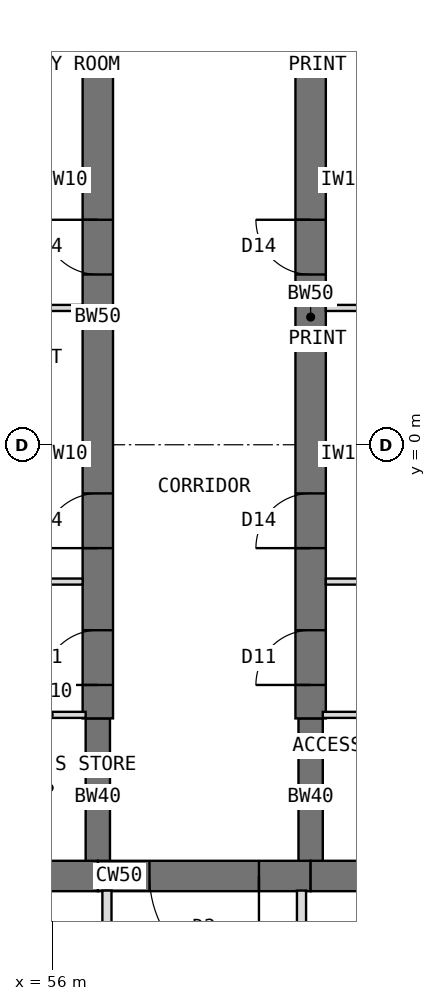
"""IFC4 building model, lengths in metres.
Left out: names, types, materials, properties, quantities, classifications, styles, units other than length and angle.
Written with IfcOpenShell. Run it as: python <this file> out.ifc"""

import sys

from ifc_helpers import new_model, si_unit, direction, frame, frame_2d, origin, place, context, subcontext, project, spatial, rectangle, extrude, element, fill, save


model = new_model("IFC4")
c1 = context("Model", 3, precision=1e-05, world=origin(), true_north=direction((0.0, 1.0)))
c2 = subcontext(c1, "Body", "Model", "MODEL_VIEW")
j1 = project(units=[si_unit("LENGTHUNIT", "METRE"), si_unit("PLANEANGLEUNIT", "RADIAN")], contexts=[c1])
p1 = place(None, origin())
s1 = spatial("IfcSite", under=j1, at=p1, CompositionType="ELEMENT")
p2 = place(p1, origin())
s2 = spatial("IfcBuilding", under=s1, at=p2, CompositionType="ELEMENT")
p3 = place(p2, frame((0.0, 0.0, 218.5)))
s3 = spatial("IfcBuildingStorey", under=s2, at=p3, CompositionType="ELEMENT", Elevation=218.5)
p4 = place(p3, frame((64.798, -7.092, 0.0), z_axis=(0.0, 0.0, 1.0), x_axis=(-1.0, 0.0, 0.0)))
e1 = element("IfcWall", 1, at=p4, inside=s3, PredefinedType="SHEAR", context=c2, shape_type="SweptSolid", body=[
    extrude(rectangle(XDim=4.548, YDim=0.5, at=frame_2d((2.274, 0.0))), origin(), (0.0, 0.0, 1.0), 4.0),
])
p5 = place(p3, frame((60.25, -7.092, 0.0), z_axis=(0.0, 0.0, 1.0), x_axis=(-1.0, 0.0, 0.0)))
e2 = element("IfcWall", 2, at=p5, inside=s3, PredefinedType="SHEAR", context=c2, shape_type="SweptSolid", body=[
    extrude(rectangle(XDim=3.5, YDim=0.5, at=frame_2d((1.75, 0.0))), origin(), (0.0, 0.0, 1.0), 4.0),
])
p6 = place(p5, frame((0.85, 0.0, 0.0)))
e3 = element("IfcOpeningElement", 3, at=p6, cuts=e2, PredefinedType="OPENING", context=c2, shape_type="SweptSolid", body=[
    extrude(rectangle(XDim=1.8, YDim=2.1, at=frame_2d((0.9, 1.05))), frame((0.0, 0.26, 0.0), z_axis=(0.0, -1.0, 0.0), x_axis=(1.0, 0.0, 0.0)), (0.0, 0.0, 1.0), 0.52),
])
p7 = place(p3, frame((56.75, -7.092, 0.0), z_axis=(0.0, 0.0, 1.0), x_axis=(-1.0, 0.0, 0.0)))
e4 = element("IfcWall", 4, at=p7, inside=s3, PredefinedType="SHEAR", context=c2, shape_type="SweptSolid", body=[
    extrude(rectangle(XDim=4.548, YDim=0.5, at=frame_2d((2.274, 0.0))), origin(), (0.0, 0.0, 1.0), 4.0),
])
p8 = place(p3, frame((56.75, -7.092, 0.0), z_axis=(0.0, 0.0, 1.0), x_axis=(0.0, 1.0, 0.0)))
e5 = element("IfcWall", 5, at=p8, inside=s3, PredefinedType="SHEAR", context=c2, shape_type="SweptSolid", body=[
    extrude(rectangle(XDim=2.592, YDim=0.4, at=frame_2d((1.296, 0.0))), origin(), (0.0, 0.0, 1.0), 4.0),
])
p9 = place(p3, frame((56.75, -4.5, 0.0), z_axis=(0.0, 0.0, 1.0), x_axis=(0.0, 1.0, 0.0)))
e6 = element("IfcWall", 6, at=p9, inside=s3, PredefinedType="SHEAR", context=c2, shape_type="SweptSolid", body=[
    extrude(rectangle(XDim=13.2, YDim=0.5, at=frame_2d((6.6, 0.0))), origin(), (0.0, 0.0, 1.0), 4.0),
])
p10 = place(p9, frame((0.55, 0.0, 0.0)))
e7 = element("IfcOpeningElement", 7, at=p10, cuts=e6, PredefinedType="OPENING", context=c2, shape_type="SweptSolid", body=[
    extrude(rectangle(XDim=0.9, YDim=2.1, at=frame_2d((0.45, 1.05))), frame((0.0, 0.26, 0.0), z_axis=(0.0, -1.0, 0.0), x_axis=(1.0, 0.0, 0.0)), (0.0, 0.0, 1.0), 0.52),
])
p11 = place(p9, frame((2.8, 0.0, 0.0)))
e8 = element("IfcOpeningElement", 8, at=p11, cuts=e6, PredefinedType="OPENING", context=c2, shape_type="SweptSolid", body=[
    extrude(rectangle(XDim=0.9, YDim=2.1, at=frame_2d((0.45, 1.05))), frame((0.0, 0.26, 0.0), z_axis=(0.0, -1.0, 0.0), x_axis=(1.0, 0.0, 0.0)), (0.0, 0.0, 1.0), 0.52),
])
p12 = place(p9, frame((7.3, 0.0, 0.0)))
e9 = element("IfcOpeningElement", 9, at=p12, cuts=e6, PredefinedType="OPENING", context=c2, shape_type="SweptSolid", body=[
    extrude(rectangle(XDim=0.9, YDim=2.1, at=frame_2d((0.45, 1.05))), frame((0.0, 0.26, 0.0), z_axis=(0.0, -1.0, 0.0), x_axis=(1.0, 0.0, 0.0)), (0.0, 0.0, 1.0), 0.52),
])
p13 = place(p3, frame((60.25, -7.092, 0.0), z_axis=(0.0, 0.0, 1.0), x_axis=(0.0, 1.0, 0.0)))
e10 = element("IfcWall", 10, at=p13, inside=s3, PredefinedType="SHEAR", context=c2, shape_type="SweptSolid", body=[
    extrude(rectangle(XDim=2.592, YDim=0.4, at=frame_2d((1.296, 0.0))), origin(), (0.0, 0.0, 1.0), 4.0),
])
p14 = place(p3, frame((60.25, -4.5, 0.0), z_axis=(0.0, 0.0, 1.0), x_axis=(0.0, 1.0, 0.0)))
e11 = element("IfcWall", 11, at=p14, inside=s3, PredefinedType="SHEAR", context=c2, shape_type="SweptSolid", body=[
    extrude(rectangle(XDim=13.2, YDim=0.5, at=frame_2d((6.6, 0.0))), origin(), (0.0, 0.0, 1.0), 4.0),
])
p15 = place(p14, frame((0.55, 0.0, 0.0)))
e12 = element("IfcOpeningElement", 12, at=p15, cuts=e11, PredefinedType="OPENING", context=c2, shape_type="SweptSolid", body=[
    extrude(rectangle(XDim=0.9, YDim=2.1, at=frame_2d((0.45, 1.05))), frame((0.0, 0.26, 0.0), z_axis=(0.0, -1.0, 0.0), x_axis=(1.0, 0.0, 0.0)), (0.0, 0.0, 1.0), 0.52),
])
p16 = place(p14, frame((2.8, 0.0, 0.0)))
e13 = element("IfcOpeningElement", 13, at=p16, cuts=e11, PredefinedType="OPENING", context=c2, shape_type="SweptSolid", body=[
    extrude(rectangle(XDim=0.9, YDim=2.1, at=frame_2d((0.45, 1.05))), frame((0.0, 0.26, 0.0), z_axis=(0.0, -1.0, 0.0), x_axis=(1.0, 0.0, 0.0)), (0.0, 0.0, 1.0), 0.52),
])
p17 = place(p14, frame((7.3, 0.0, 0.0)))
e14 = element("IfcOpeningElement", 14, at=p17, cuts=e11, PredefinedType="OPENING", context=c2, shape_type="SweptSolid", body=[
    extrude(rectangle(XDim=0.9, YDim=2.1, at=frame_2d((0.45, 1.05))), frame((0.0, 0.26, 0.0), z_axis=(0.0, -1.0, 0.0), x_axis=(1.0, 0.0, 0.0)), (0.0, 0.0, 1.0), 0.52),
])
for number, where, z_axis, x_axis in (
    (15, (56.5, -2.25, 0.0), (0.0, 0.0, 1.0), (-1.0, 0.0, 0.0)),
    (16, (56.5, 2.25, 0.0), (0.0, 0.0, 1.0), (-1.0, 0.0, 0.0)),
):
    element("IfcWall", number, at=place(p3, frame(where, z_axis=z_axis, x_axis=x_axis)), inside=s3, PredefinedType="PARTITIONING", context=c2, shape_type="SweptSolid", body=[
        extrude(rectangle(XDim=4.75, YDim=0.1, at=frame_2d((2.375, 0.0))), origin(), (0.0, 0.0, 1.0), 3.8),
    ])
p18 = place(p3, frame((56.5, -0.15, 0.0), z_axis=(0.0, 0.0, 1.0), x_axis=(-1.0, 0.0, 0.0)))
e17 = element("IfcWall", 17, at=p18, inside=s3, PredefinedType="PARTITIONING", context=c2, shape_type="SweptSolid", body=[
    extrude(rectangle(XDim=2.4, YDim=0.1, at=frame_2d((1.2, 0.0))), origin(), (0.0, 0.0, 1.0), 3.8),
])
p19 = place(p18, frame((0.75, 0.0, 0.0)))
e18 = element("IfcOpeningElement", 18, at=p19, cuts=e17, PredefinedType="OPENING", context=c2, shape_type="SweptSolid", body=[
    extrude(rectangle(XDim=0.9, YDim=2.1, at=frame_2d((0.45, 1.05))), frame((0.0, 0.06, 0.0), z_axis=(0.0, -1.0, 0.0), x_axis=(1.0, 0.0, 0.0)), (0.0, 0.0, 1.0), 0.12),
])
p20 = place(p3, frame((56.5, 4.35, 0.0), z_axis=(0.0, 0.0, 1.0), x_axis=(-1.0, 0.0, 0.0)))
e19 = element("IfcWall", 19, at=p20, inside=s3, PredefinedType="PARTITIONING", context=c2, shape_type="SweptSolid", body=[
    extrude(rectangle(XDim=2.4, YDim=0.1, at=frame_2d((1.2, 0.0))), origin(), (0.0, 0.0, 1.0), 3.8),
])
p21 = place(p20, frame((0.75, 0.0, 0.0)))
e20 = element("IfcOpeningElement", 20, at=p21, cuts=e19, PredefinedType="OPENING", context=c2, shape_type="SweptSolid", body=[
    extrude(rectangle(XDim=0.9, YDim=2.1, at=frame_2d((0.45, 1.05))), frame((0.0, 0.06, 0.0), z_axis=(0.0, -1.0, 0.0), x_axis=(1.0, 0.0, 0.0)), (0.0, 0.0, 1.0), 0.12),
])
p22 = place(p3, frame((56.55, -4.442, 0.0), z_axis=(0.0, 0.0, 1.0), x_axis=(-1.0, 0.0, 0.0)))
e21 = element("IfcWall", 21, at=p22, inside=s3, PredefinedType="PARTITIONING", context=c2, shape_type="SweptSolid", body=[
    extrude(rectangle(XDim=1.2, YDim=0.1, at=frame_2d((0.6, 0.0))), origin(), (0.0, 0.0, 1.0), 3.267),
])
for number, where, z_axis, x_axis in (
    (22, (60.5, -2.25, 0.0), (0.0, 0.0, 1.0), (1.0, 0.0, 0.0)),
    (23, (60.5, 2.25, 0.0), (0.0, 0.0, 1.0), (1.0, 0.0, 0.0)),
):
    element("IfcWall", number, at=place(p3, frame(where, z_axis=z_axis, x_axis=x_axis)), inside=s3, PredefinedType="PARTITIONING", context=c2, shape_type="SweptSolid", body=[
        extrude(rectangle(XDim=4.75, YDim=0.1, at=frame_2d((2.375, 0.0))), origin(), (0.0, 0.0, 1.0), 3.8),
    ])
p23 = place(p3, frame((60.5, -0.15, 0.0), z_axis=(0.0, 0.0, 1.0), x_axis=(1.0, 0.0, 0.0)))
e24 = element("IfcWall", 24, at=p23, inside=s3, PredefinedType="PARTITIONING", context=c2, shape_type="SweptSolid", body=[
    extrude(rectangle(XDim=2.4, YDim=0.1, at=frame_2d((1.2, 0.0))), origin(), (0.0, 0.0, 1.0), 3.8),
])
p24 = place(p23, frame((0.75, 0.0, 0.0)))
e25 = element("IfcOpeningElement", 25, at=p24, cuts=e24, PredefinedType="OPENING", context=c2, shape_type="SweptSolid", body=[
    extrude(rectangle(XDim=0.9, YDim=2.1, at=frame_2d((0.45, 1.05))), frame((0.0, 0.06, 0.0), z_axis=(0.0, -1.0, 0.0), x_axis=(1.0, 0.0, 0.0)), (0.0, 0.0, 1.0), 0.12),
])
p25 = place(p3, frame((60.5, 4.35, 0.0), z_axis=(0.0, 0.0, 1.0), x_axis=(1.0, 0.0, 0.0)))
e26 = element("IfcWall", 26, at=p25, inside=s3, PredefinedType="PARTITIONING", context=c2, shape_type="SweptSolid", body=[
    extrude(rectangle(XDim=2.4, YDim=0.1, at=frame_2d((1.2, 0.0))), origin(), (0.0, 0.0, 1.0), 3.8),
])
p26 = place(p25, frame((0.75, 0.0, 0.0)))
e27 = element("IfcOpeningElement", 27, at=p26, cuts=e26, PredefinedType="OPENING", context=c2, shape_type="SweptSolid", body=[
    extrude(rectangle(XDim=0.9, YDim=2.1, at=frame_2d((0.45, 1.05))), frame((0.0, 0.06, 0.0), z_axis=(0.0, -1.0, 0.0), x_axis=(1.0, 0.0, 0.0)), (0.0, 0.0, 1.0), 0.12),
])
p27 = place(p3, frame((60.45, -4.442, 0.0), z_axis=(0.0, 0.0, 1.0), x_axis=(1.0, 0.0, 0.0)))
e28 = element("IfcWall", 28, at=p27, inside=s3, PredefinedType="PARTITIONING", context=c2, shape_type="SweptSolid", body=[
    extrude(rectangle(XDim=3.2, YDim=0.1, at=frame_2d((1.6, 0.0))), origin(), (0.0, 0.0, 1.0), 3.267),
])
p28 = place(p3, frame((56.9, -11.9, 0.0), z_axis=(0.0, 0.0, 1.0), x_axis=(0.0, 1.0, 0.0)))
e29 = element("IfcWall", 29, at=p28, inside=s3, PredefinedType="PARTITIONING", context=c2, shape_type="SweptSolid", body=[
    extrude(rectangle(XDim=4.568, YDim=0.15, at=frame_2d((2.284, 0.0))), origin(), (0.0, 0.0, 1.0), 3.8),
])
p29 = place(p28, frame((1.794, 0.0, 0.0)))
e30 = element("IfcOpeningElement", 30, at=p29, cuts=e29, PredefinedType="OPENING", context=c2, shape_type="SweptSolid", body=[
    extrude(rectangle(XDim=1.0, YDim=2.1, at=frame_2d((0.5, 1.05))), frame((0.0, 0.085, 0.0), z_axis=(0.0, -1.0, 0.0), x_axis=(1.0, 0.0, 0.0)), (0.0, 0.0, 1.0), 0.17),
])
p30 = place(p3, frame((60.1, -7.332, 0.0), z_axis=(0.0, 0.0, 1.0), x_axis=(0.0, -1.0, 0.0)))
e31 = element("IfcWall", 31, at=p30, inside=s3, PredefinedType="PARTITIONING", context=c2, shape_type="SweptSolid", body=[
    extrude(rectangle(XDim=4.568, YDim=0.15, at=frame_2d((2.284, 0.0))), origin(), (0.0, 0.0, 1.0), 3.8),
])
p31 = place(p30, frame((1.774, 0.0, 0.0)))
e32 = element("IfcOpeningElement", 32, at=p31, cuts=e31, PredefinedType="OPENING", context=c2, shape_type="SweptSolid", body=[
    extrude(rectangle(XDim=1.0, YDim=2.1, at=frame_2d((0.5, 1.05))), frame((0.0, 0.085, 0.0), z_axis=(0.0, -1.0, 0.0), x_axis=(1.0, 0.0, 0.0)), (0.0, 0.0, 1.0), 0.17),
])
p32 = place(p6, origin())
e33 = element("IfcDoor", 33, at=p32, inside=s3, OperationType="DOUBLE_DOOR_DOUBLE_SWING", PredefinedType="DOOR", context=c2, shape_type="SweptSolid", body=[
    extrude(rectangle(XDim=1.8, YDim=2.1, at=frame_2d((0.9, 1.05))), frame((0.0, 0.025, 0.0), z_axis=(0.0, -1.0, 0.0), x_axis=(1.0, 0.0, 0.0)), (0.0, 0.0, 1.0), 0.05),
])
fill(e3, e33)
p33 = place(p10, origin())
e34 = element("IfcDoor", 34, at=p33, inside=s3, OperationType="SINGLE_SWING_LEFT", PredefinedType="DOOR", context=c2, shape_type="SweptSolid", body=[
    extrude(rectangle(XDim=0.9, YDim=2.1, at=frame_2d((0.45, 1.05))), frame((0.0, 0.025, 0.0), z_axis=(0.0, -1.0, 0.0), x_axis=(1.0, 0.0, 0.0)), (0.0, 0.0, 1.0), 0.05),
])
fill(e7, e34)
p34 = place(p11, origin())
e35 = element("IfcDoor", 35, at=p34, inside=s3, OperationType="SINGLE_SWING_LEFT", PredefinedType="DOOR", context=c2, shape_type="SweptSolid", body=[
    extrude(rectangle(XDim=0.9, YDim=2.1, at=frame_2d((0.45, 1.05))), frame((0.0, 0.025, 0.0), z_axis=(0.0, -1.0, 0.0), x_axis=(1.0, 0.0, 0.0)), (0.0, 0.0, 1.0), 0.05),
])
fill(e8, e35)
p35 = place(p12, origin())
e36 = element("IfcDoor", 36, at=p35, inside=s3, OperationType="SINGLE_SWING_RIGHT", PredefinedType="DOOR", context=c2, shape_type="SweptSolid", body=[
    extrude(rectangle(XDim=0.9, YDim=2.1, at=frame_2d((0.45, 1.05))), frame((0.0, 0.025, 0.0), z_axis=(0.0, -1.0, 0.0), x_axis=(1.0, 0.0, 0.0)), (0.0, 0.0, 1.0), 0.05),
])
fill(e9, e36)
p36 = place(p15, origin())
e37 = element("IfcDoor", 37, at=p36, inside=s3, OperationType="SINGLE_SWING_LEFT", PredefinedType="DOOR", context=c2, shape_type="SweptSolid", body=[
    extrude(rectangle(XDim=0.9, YDim=2.1, at=frame_2d((0.45, 1.05))), frame((0.0, 0.025, 0.0), z_axis=(0.0, -1.0, 0.0), x_axis=(1.0, 0.0, 0.0)), (0.0, 0.0, 1.0), 0.05),
])
fill(e12, e37)
p37 = place(p16, origin())
e38 = element("IfcDoor", 38, at=p37, inside=s3, OperationType="SINGLE_SWING_LEFT", PredefinedType="DOOR", context=c2, shape_type="SweptSolid", body=[
    extrude(rectangle(XDim=0.9, YDim=2.1, at=frame_2d((0.45, 1.05))), frame((0.0, 0.025, 0.0), z_axis=(0.0, -1.0, 0.0), x_axis=(1.0, 0.0, 0.0)), (0.0, 0.0, 1.0), 0.05),
])
fill(e13, e38)
p38 = place(p17, origin())
e39 = element("IfcDoor", 39, at=p38, inside=s3, OperationType="SINGLE_SWING_RIGHT", PredefinedType="DOOR", context=c2, shape_type="SweptSolid", body=[
    extrude(rectangle(XDim=0.9, YDim=2.1, at=frame_2d((0.45, 1.05))), frame((0.0, 0.025, 0.0), z_axis=(0.0, -1.0, 0.0), x_axis=(1.0, 0.0, 0.0)), (0.0, 0.0, 1.0), 0.05),
])
fill(e14, e39)
save(model, sys.argv[1])
